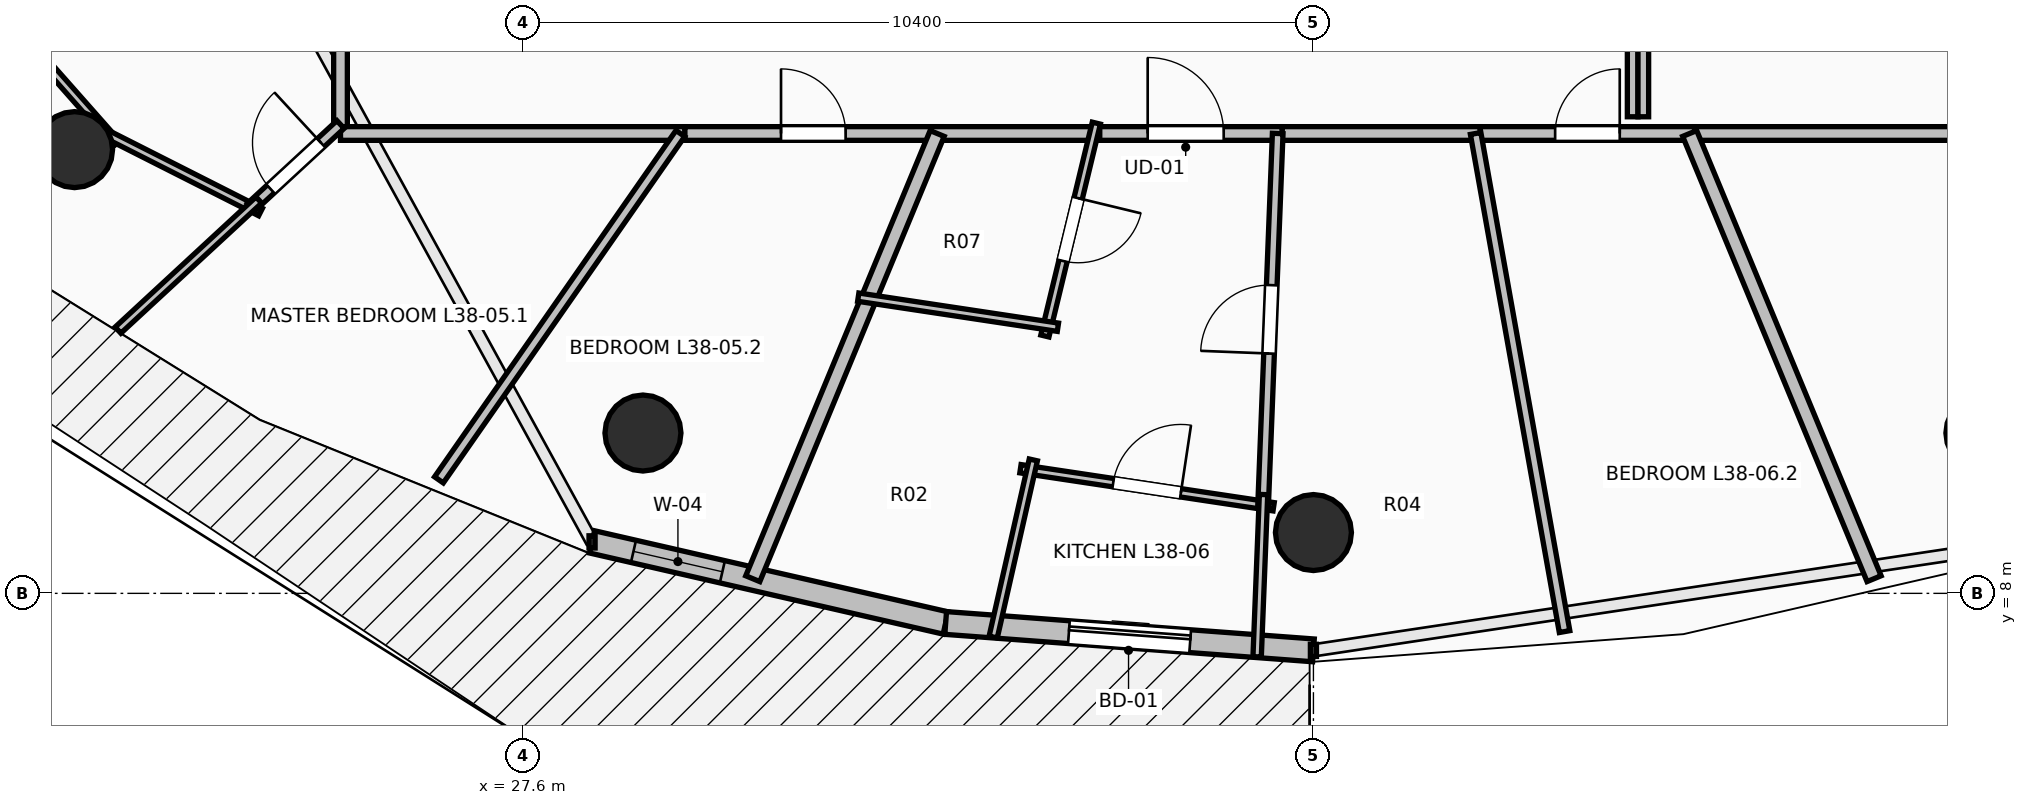
"""IFC4 building model, lengths in metres.
Left out: names, types, materials, properties, quantities, classifications, styles, units other than length and angle.
Written with IfcOpenShell. Run it as: python <this file> out.ifc"""

import sys

from ifc_helpers import new_model, si_unit, direction, frame, frame_2d, origin, origin_2d, place, context, subcontext, project, spatial, rectangle, circle, extrude, element, fill, save


model = new_model("IFC4")
c1 = context("Model", 3, precision=1e-05, world=origin(), true_north=direction((0.0, 1.0)))
c2 = subcontext(c1, "Body", "Model", "MODEL_VIEW")
j1 = project(units=[si_unit("LENGTHUNIT", "METRE"), si_unit("PLANEANGLEUNIT", "RADIAN")], contexts=[c1])
p1 = place(None, origin())
s1 = spatial("IfcSite", under=j1, at=p1, CompositionType="ELEMENT")
p2 = place(p1, origin())
s2 = spatial("IfcBuilding", under=s1, at=p2, CompositionType="ELEMENT")
p3 = place(p2, frame((0.0, 0.0, 143.1)))
s3 = spatial("IfcBuildingStorey", under=s2, at=p3, CompositionType="ELEMENT", Elevation=143.1)
for number, where, z_axis, x_axis in (
    (1, (21.701, 13.838, 0.0), (0.0, 0.0, 1.0), (-0.707, -0.707, 0.0)),
    (2, (29.179, 10.109, 0.0), (0.0, 0.0, 1.0), (-0.383, -0.924, 0.0)),
    (3, (38.0, 8.8, 0.0), (0.0, 0.0, 1.0), (0.0, -1.0, 0.0)),
    (4, (46.821, 10.109, 0.0), (0.0, 0.0, 1.0), (0.383, -0.924, 0.0)),
):
    element("IfcColumn", number, at=place(p3, frame(where, z_axis=z_axis, x_axis=x_axis)), inside=s3, PredefinedType="COLUMN", context=c2, shape_type="SweptSolid", body=[
        extrude(circle(Radius=0.5, at=origin_2d()), origin(), (0.0, 0.0, 1.0), 3.5),
    ])
p4 = place(p3, frame((28.51, 8.677, 0.0), z_axis=(0.0, 0.0, 1.0), x_axis=(0.974698897188, -0.223521944832, 0.0)))
e5 = element("IfcWall", 5, at=p4, inside=s3, PredefinedType="STANDARD", context=c2, shape_type="SweptSolid", body=[
    extrude(rectangle(XDim=4.773, YDim=0.3, at=frame_2d((2.387, 0.0))), origin(), (0.0, 0.0, 1.0), 3.24),
])
p5 = place(p4, frame((0.559, 0.0, 0.85)))
e6 = element("IfcOpeningElement", 6, at=p5, cuts=e5, PredefinedType="OPENING", context=c2, shape_type="SweptSolid", body=[
    extrude(rectangle(XDim=1.2, YDim=1.95, at=frame_2d((0.6, 0.975))), frame((0.0, 0.165, 0.0), z_axis=(0.0, -1.0, 0.0), x_axis=(1.0, 0.0, 0.0)), (0.0, 0.0, 1.0), 0.33),
])
p6 = place(p3, frame((33.162, 7.61, 0.0), z_axis=(0.0, 0.0, 1.0), x_axis=(0.997237740067, -0.074275768499, 0.0)))
e7 = element("IfcWall", 7, at=p6, inside=s3, PredefinedType="STANDARD", context=c2, shape_type="SweptSolid", body=[
    extrude(rectangle(XDim=4.852, YDim=0.3, at=frame_2d((2.426, 0.0))), origin(), (0.0, 0.0, 1.0), 3.24),
])
p7 = place(p6, frame((1.626, 0.0, 0.0)))
e8 = element("IfcOpeningElement", 8, at=p7, cuts=e7, PredefinedType="OPENING", context=c2, shape_type="SweptSolid", body=[
    extrude(rectangle(XDim=1.6, YDim=2.3, at=frame_2d((0.8, 1.15))), frame((0.0, 0.165, 0.0), z_axis=(0.0, -1.0, 0.0), x_axis=(1.0, 0.0, 0.0)), (0.0, 0.0, 1.0), 0.33),
])
p8 = place(p3, frame((25.2, 18.244, 0.0), z_axis=(0.0, 0.0, 1.0), x_axis=(0.0, -1.0, 0.0)))
e9 = element("IfcWall", 9, at=p8, inside=s3, PredefinedType="PARTITIONING", context=c2, shape_type="SweptSolid", body=[
    extrude(rectangle(XDim=4.158, YDim=0.18, at=frame_2d((2.079, 0.0))), origin(), (0.0, 0.0, 1.0), 2.432),
])
p9 = place(p8, frame((1.579, 0.0, 0.0)))
e10 = element("IfcOpeningElement", 10, at=p9, cuts=e9, PredefinedType="OPENING", context=c2, shape_type="SweptSolid", body=[
    extrude(rectangle(XDim=1.0, YDim=2.15, at=frame_2d((0.5, 1.075))), frame((0.0, 0.105, 0.0), z_axis=(0.0, -1.0, 0.0), x_axis=(1.0, 0.0, 0.0)), (0.0, 0.0, 1.0), 0.21),
])
p10 = place(p3, frame((25.2, 14.05, 0.0), z_axis=(0.0, 0.0, 1.0), x_axis=(1.0, 0.0, 0.0)))
e11 = element("IfcWall", 11, at=p10, inside=s3, PredefinedType="PARTITIONING", context=c2, shape_type="SweptSolid", body=[
    extrude(rectangle(XDim=4.531, YDim=0.18, at=frame_2d((2.266, 0.0))), origin(), (0.0, 0.0, 1.0), 2.432),
])
p11 = place(p3, frame((29.731, 14.05, 0.0), z_axis=(0.0, 0.0, 1.0), x_axis=(1.0, 0.0, 0.0)))
e12 = element("IfcWall", 12, at=p11, inside=s3, PredefinedType="PARTITIONING", context=c2, shape_type="SweptSolid", body=[
    extrude(rectangle(XDim=3.379, YDim=0.18, at=frame_2d((1.689, 0.0))), origin(), (0.0, 0.0, 1.0), 2.972),
])
p12 = place(p11, frame((1.264, 0.0, 0.0)))
e13 = element("IfcOpeningElement", 13, at=p12, cuts=e12, PredefinedType="OPENING", context=c2, shape_type="SweptSolid", body=[
    extrude(rectangle(XDim=0.85, YDim=2.1, at=frame_2d((0.425, 1.05))), frame((0.0, 0.105, 0.0), z_axis=(0.0, -1.0, 0.0), x_axis=(1.0, 0.0, 0.0)), (0.0, 0.0, 1.0), 0.21),
])
p13 = place(p3, frame((35.049, 14.05, 0.0), z_axis=(0.0, 0.0, 1.0), x_axis=(1.0, 0.0, 0.0)))
e14 = element("IfcWall", 14, at=p13, inside=s3, PredefinedType="PARTITIONING", context=c2, shape_type="SweptSolid", body=[
    extrude(rectangle(XDim=2.541, YDim=0.18, at=frame_2d((1.271, 0.0))), origin(), (0.0, 0.0, 1.0), 2.972),
])
p14 = place(p13, frame((0.771, 0.0, 0.0)))
e15 = element("IfcOpeningElement", 15, at=p14, cuts=e14, PredefinedType="OPENING", context=c2, shape_type="SweptSolid", body=[
    extrude(rectangle(XDim=1.0, YDim=2.15, at=frame_2d((0.5, 1.075))), frame((0.0, 0.105, 0.0), z_axis=(0.0, -1.0, 0.0), x_axis=(1.0, 0.0, 0.0)), (0.0, 0.0, 1.0), 0.21),
])
p15 = place(p3, frame((32.97, 14.05, 0.0), z_axis=(0.0, 0.0, 1.0), x_axis=(1.0, 0.0, 0.0)))
e16 = element("IfcWall", 16, at=p15, inside=s3, PredefinedType="PARTITIONING", context=c2, shape_type="SweptSolid", body=[
    extrude(rectangle(XDim=2.219, YDim=0.18, at=frame_2d((1.109, 0.0))), origin(), (0.0, 0.0, 1.0), 2.972),
])
p16 = place(p3, frame((37.59, 14.05, 0.0), z_axis=(0.0, 0.0, 1.0), x_axis=(1.0, 0.0, 0.0)))
e17 = element("IfcWall", 17, at=p16, inside=s3, PredefinedType="PARTITIONING", context=c2, shape_type="SweptSolid", body=[
    extrude(rectangle(XDim=2.605, YDim=0.18, at=frame_2d((1.302, 0.0))), origin(), (0.0, 0.0, 1.0), 2.972),
])
p17 = place(p3, frame((40.195, 14.05, 0.0), z_axis=(0.0, 0.0, 1.0), x_axis=(1.0, 0.0, 0.0)))
e18 = element("IfcWall", 18, at=p17, inside=s3, PredefinedType="PARTITIONING", context=c2, shape_type="SweptSolid", body=[
    extrude(rectangle(XDim=2.82, YDim=0.18, at=frame_2d((1.41, 0.0))), origin(), (0.0, 0.0, 1.0), 2.972),
])
p18 = place(p17, frame((0.985, 0.0, 0.0)))
e19 = element("IfcOpeningElement", 19, at=p18, cuts=e18, PredefinedType="OPENING", context=c2, shape_type="SweptSolid", body=[
    extrude(rectangle(XDim=0.85, YDim=2.1, at=frame_2d((0.425, 1.05))), frame((0.0, 0.105, 0.0), z_axis=(0.0, -1.0, 0.0), x_axis=(1.0, 0.0, 0.0)), (0.0, 0.0, 1.0), 0.21),
])
p19 = place(p3, frame((43.015, 14.05, 0.0), z_axis=(0.0, 0.0, 1.0), x_axis=(1.0, 0.0, 0.0)))
e20 = element("IfcWall", 20, at=p19, inside=s3, PredefinedType="PARTITIONING", context=c2, shape_type="SweptSolid", body=[
    extrude(rectangle(XDim=7.785, YDim=0.18, at=frame_2d((3.893, 0.0))), origin(), (0.0, 0.0, 1.0), 2.432),
])
p20 = place(p19, frame((3.393, 0.0, 0.0)))
e21 = element("IfcOpeningElement", 21, at=p20, cuts=e20, PredefinedType="OPENING", context=c2, shape_type="SweptSolid", body=[
    extrude(rectangle(XDim=1.0, YDim=2.15, at=frame_2d((0.5, 1.075))), frame((0.0, 0.105, 0.0), z_axis=(0.0, -1.0, 0.0), x_axis=(1.0, 0.0, 0.0)), (0.0, 0.0, 1.0), 0.21),
])
p21 = place(p3, frame((20.935, 15.409, 0.0), z_axis=(0.0, 0.0, 1.0), x_axis=(0.66216897397, -0.749354555542, 0.0)))
e22 = element("IfcWall", 22, at=p21, inside=s3, PredefinedType="PARTITIONING", context=c2, shape_type="SweptSolid", body=[
    extrude(rectangle(XDim=1.991, YDim=0.11, at=frame_2d((0.996, 0.0))), origin(), (0.0, 0.0, 1.0), 2.432),
])
p22 = place(p3, frame((22.036, 14.085, 0.0), z_axis=(0.0, 0.0, 1.0), x_axis=(0.892312874209, -0.451417472548, 0.0)))
e23 = element("IfcWall", 23, at=p22, inside=s3, PredefinedType="PARTITIONING", context=c2, shape_type="SweptSolid", body=[
    extrude(rectangle(XDim=2.367, YDim=0.11, at=frame_2d((1.183, 0.0))), origin(), (0.0, 0.0, 1.0), 2.432),
])
p23 = place(p3, frame((24.023, 13.08, 0.0), z_axis=(0.0, 0.0, 1.0), x_axis=(0.734359451791, 0.678760779336, 0.0)))
e24 = element("IfcWall", 24, at=p23, inside=s3, PredefinedType="PARTITIONING", context=c2, shape_type="SweptSolid", body=[
    extrude(rectangle(XDim=1.603, YDim=0.14, at=frame_2d((0.801, 0.0))), origin(), (0.0, 0.0, 1.0), 2.922),
])
p24 = place(p23, frame((0.351, 0.0, 0.0)))
e25 = element("IfcOpeningElement", 25, at=p24, cuts=e24, PredefinedType="OPENING", context=c2, shape_type="SweptSolid", body=[
    extrude(rectangle(XDim=0.9, YDim=2.1, at=frame_2d((0.45, 1.05))), frame((0.0, 0.085, 0.0), z_axis=(0.0, -1.0, 0.0), x_axis=(1.0, 0.0, 0.0)), (0.0, 0.0, 1.0), 0.17),
])
p25 = place(p3, frame((22.273, 11.463, 0.0), z_axis=(0.0, 0.0, 1.0), x_axis=(0.73438401738, 0.678734200565, 0.0)))
e26 = element("IfcWall", 26, at=p25, inside=s3, PredefinedType="PARTITIONING", context=c2, shape_type="SweptSolid", body=[
    extrude(rectangle(XDim=2.522, YDim=0.11, at=frame_2d((1.261, 0.0))), origin(), (0.0, 0.0, 1.0), 2.728),
])
p26 = place(p3, frame((26.495, 9.493, 0.0), z_axis=(0.0, 0.0, 1.0), x_axis=(0.571744252323, 0.820431904509, 0.0)))
e27 = element("IfcWall", 27, at=p26, inside=s3, PredefinedType="PARTITIONING", context=c2, shape_type="SweptSolid", body=[
    extrude(rectangle(XDim=5.554, YDim=0.14, at=frame_2d((2.777, 0.0))), origin(), (0.0, 0.0, 1.0), 2.432),
])
p27 = place(p3, frame((30.624, 8.193, 0.0), z_axis=(0.0, 0.0, 1.0), x_axis=(0.382683979298, 0.923879305964, 0.0)))
e28 = element("IfcWall", 28, at=p27, inside=s3, PredefinedType="PARTITIONING", context=c2, shape_type="SweptSolid", body=[
    extrude(rectangle(XDim=6.34, YDim=0.2, at=frame_2d((3.17, 0.0))), origin(), (0.0, 0.0, 1.0), 2.728),
])
p28 = place(p3, frame((35.144, 14.186, 0.0), z_axis=(0.0, 0.0, 1.0), x_axis=(-0.234930486238, -0.972012174119, 0.0)))
e29 = element("IfcWall", 29, at=p28, inside=s3, PredefinedType="PARTITIONING", context=c2, shape_type="SweptSolid", body=[
    extrude(rectangle(XDim=2.881, YDim=0.11, at=frame_2d((1.44, 0.0))), origin(), (0.0, 0.0, 1.0), 2.922),
])
p29 = place(p28, frame((1.015, 0.0, 0.0)))
e30 = element("IfcOpeningElement", 30, at=p29, cuts=e29, PredefinedType="OPENING", context=c2, shape_type="SweptSolid", body=[
    extrude(rectangle(XDim=0.85, YDim=2.1, at=frame_2d((0.425, 1.05))), frame((0.0, 0.07, 0.0), z_axis=(0.0, -1.0, 0.0), x_axis=(1.0, 0.0, 0.0)), (0.0, 0.0, 1.0), 0.14),
])
p30 = place(p3, frame((34.638, 11.501, 0.0), z_axis=(0.0, 0.0, 1.0), x_axis=(-0.988839741605, 0.148983104484, 0.0)))
e31 = element("IfcWall", 31, at=p30, inside=s3, PredefinedType="PARTITIONING", context=c2, shape_type="SweptSolid", body=[
    extrude(rectangle(XDim=2.656, YDim=0.11, at=frame_2d((1.328, 0.0))), origin(), (0.0, 0.0, 1.0), 3.24),
])
p31 = place(p3, frame((34.146, 9.64, 0.0), z_axis=(0.0, 0.0, 1.0), x_axis=(0.988887919082, -0.148662986296, 0.0)))
e32 = element("IfcWall", 32, at=p31, inside=s3, PredefinedType="PARTITIONING", context=c2, shape_type="SweptSolid", body=[
    extrude(rectangle(XDim=3.368, YDim=0.11, at=frame_2d((1.684, 0.0))), origin(), (0.0, 0.0, 1.0), 3.24),
])
p32 = place(p31, frame((1.234, 0.0, 0.0)))
e33 = element("IfcOpeningElement", 33, at=p32, cuts=e32, PredefinedType="OPENING", context=c2, shape_type="SweptSolid", body=[
    extrude(rectangle(XDim=0.9, YDim=2.1, at=frame_2d((0.45, 1.05))), frame((0.0, 0.07, 0.0), z_axis=(0.0, -1.0, 0.0), x_axis=(1.0, 0.0, 0.0)), (0.0, 0.0, 1.0), 0.14),
])
p33 = place(p3, frame((33.787, 7.426, 0.0), z_axis=(0.0, 0.0, 1.0), x_axis=(0.220932027223, 0.975289208054, 0.0)))
e34 = element("IfcWall", 34, at=p33, inside=s3, PredefinedType="PARTITIONING", context=c2, shape_type="SweptSolid", body=[
    extrude(rectangle(XDim=2.389, YDim=0.11, at=frame_2d((1.195, 0.0))), origin(), (0.0, 0.0, 1.0), 2.728),
])
p34 = place(p3, frame((37.338, 9.16, 0.0), z_axis=(0.0, 0.0, 1.0), x_axis=(0.039260769946, 0.99922899875, 0.0)))
e35 = element("IfcWall", 35, at=p34, inside=s3, PredefinedType="PARTITIONING", context=c2, shape_type="SweptSolid", body=[
    extrude(rectangle(XDim=4.894, YDim=0.14, at=frame_2d((2.447, 0.0))), origin(), (0.0, 0.0, 1.0), 2.922),
])
p35 = place(p34, frame((1.997, 0.0, 0.0)))
e36 = element("IfcOpeningElement", 36, at=p35, cuts=e35, PredefinedType="OPENING", context=c2, shape_type="SweptSolid", body=[
    extrude(rectangle(XDim=0.9, YDim=2.1, at=frame_2d((0.45, 1.05))), frame((0.0, 0.085, 0.0), z_axis=(0.0, -1.0, 0.0), x_axis=(1.0, 0.0, 0.0)), (0.0, 0.0, 1.0), 0.17),
])
p36 = place(p3, frame((37.26, 7.165, 0.0), z_axis=(0.0, 0.0, 1.0), x_axis=(0.039310852952, 0.999227029679, 0.0)))
e37 = element("IfcWall", 37, at=p36, inside=s3, PredefinedType="PARTITIONING", context=c2, shape_type="SweptSolid", body=[
    extrude(rectangle(XDim=2.136, YDim=0.11, at=frame_2d((1.068, 0.0))), origin(), (0.0, 0.0, 1.0), 2.728),
])
p37 = place(p3, frame((41.304, 7.497, 0.0), z_axis=(0.0, 0.0, 1.0), x_axis=(-0.175753825846, 0.984434148484, 0.0)))
e38 = element("IfcWall", 38, at=p37, inside=s3, PredefinedType="PARTITIONING", context=c2, shape_type="SweptSolid", body=[
    extrude(rectangle(XDim=6.656, YDim=0.14, at=frame_2d((3.328, 0.0))), origin(), (0.0, 0.0, 1.0), 2.432),
])
p38 = place(p3, frame((45.376, 8.193, 0.0), z_axis=(0.0, 0.0, 1.0), x_axis=(-0.382683979298, 0.923879305964, 0.0)))
e39 = element("IfcWall", 39, at=p38, inside=s3, PredefinedType="PARTITIONING", context=c2, shape_type="SweptSolid", body=[
    extrude(rectangle(XDim=6.34, YDim=0.2, at=frame_2d((3.17, 0.0))), origin(), (0.0, 0.0, 1.0), 2.432),
])
for number, where, z_axis, x_axis in (
    (40, (42.2, 16.1, 0.0), (0.0, 0.0, 1.0), (0.0, -1.0, 0.0)),
    (41, (42.34, 14.27, 0.0), (0.0, 0.0, 1.0), (0.0, 1.0, 0.0)),
):
    element("IfcWall", number, at=place(p3, frame(where, z_axis=z_axis, x_axis=x_axis)), inside=s3, PredefinedType="PARTITIONING", context=c2, shape_type="SweptSolid", body=[
        extrude(rectangle(XDim=1.83, YDim=0.14, at=frame_2d((0.915, 0.0))), origin(), (0.0, 0.0, 1.0), 3.24),
    ])
p39 = place(p7, origin())
e42 = element("IfcDoor", 42, at=p39, inside=s3, OperationType="SLIDING_TO_LEFT", PredefinedType="DOOR", context=c2, shape_type="SweptSolid", body=[
    extrude(rectangle(XDim=1.6, YDim=2.3, at=frame_2d((0.8, 1.15))), frame((0.0, 0.025, 0.0), z_axis=(0.0, -1.0, 0.0), x_axis=(1.0, 0.0, 0.0)), (0.0, 0.0, 1.0), 0.05),
])
fill(e8, e42)
p40 = place(p5, origin())
e43 = element("IfcWindow", 43, at=p40, inside=s3, PartitioningType="SINGLE_PANEL", PredefinedType="WINDOW", context=c2, shape_type="SweptSolid", body=[
    extrude(rectangle(XDim=1.2, YDim=1.95, at=frame_2d((0.6, 0.975))), frame((0.0, 0.03, 0.0), z_axis=(0.0, -1.0, 0.0), x_axis=(1.0, 0.0, 0.0)), (0.0, 0.0, 1.0), 0.06),
])
fill(e6, e43)
p41 = place(p14, origin())
e44 = element("IfcDoor", 44, at=p41, inside=s3, OperationType="SINGLE_SWING_LEFT", PredefinedType="DOOR", context=c2, shape_type="SweptSolid", body=[
    extrude(rectangle(XDim=1.0, YDim=2.15, at=frame_2d((0.5, 1.075))), frame((0.0, 0.025, 0.0), z_axis=(0.0, -1.0, 0.0), x_axis=(1.0, 0.0, 0.0)), (0.0, 0.0, 1.0), 0.05),
])
fill(e15, e44)
p42 = place(p24, origin())
e45 = element("IfcDoor", 45, at=p42, inside=s3, OperationType="SINGLE_SWING_RIGHT", PredefinedType="DOOR", context=c2, shape_type="SweptSolid", body=[
    extrude(rectangle(XDim=0.9, YDim=2.1, at=frame_2d((0.45, 1.05))), frame((0.0, 0.025, 0.0), z_axis=(0.0, -1.0, 0.0), x_axis=(1.0, 0.0, 0.0)), (0.0, 0.0, 1.0), 0.05),
])
fill(e25, e45)
p43 = place(p29, origin())
e46 = element("IfcDoor", 46, at=p43, inside=s3, OperationType="SINGLE_SWING_LEFT", PredefinedType="DOOR", context=c2, shape_type="SweptSolid", body=[
    extrude(rectangle(XDim=0.85, YDim=2.1, at=frame_2d((0.425, 1.05))), frame((0.0, 0.025, 0.0), z_axis=(0.0, -1.0, 0.0), x_axis=(1.0, 0.0, 0.0)), (0.0, 0.0, 1.0), 0.05),
])
fill(e30, e46)
p44 = place(p32, origin())
e47 = element("IfcDoor", 47, at=p44, inside=s3, OperationType="SINGLE_SWING_RIGHT", PredefinedType="DOOR", context=c2, shape_type="SweptSolid", body=[
    extrude(rectangle(XDim=0.9, YDim=2.1, at=frame_2d((0.45, 1.05))), frame((0.0, 0.025, 0.0), z_axis=(0.0, -1.0, 0.0), x_axis=(1.0, 0.0, 0.0)), (0.0, 0.0, 1.0), 0.05),
])
fill(e33, e47)
p45 = place(p35, origin())
e48 = element("IfcDoor", 48, at=p45, inside=s3, OperationType="SINGLE_SWING_LEFT", PredefinedType="DOOR", context=c2, shape_type="SweptSolid", body=[
    extrude(rectangle(XDim=0.9, YDim=2.1, at=frame_2d((0.45, 1.05))), frame((0.0, 0.025, 0.0), z_axis=(0.0, -1.0, 0.0), x_axis=(1.0, 0.0, 0.0)), (0.0, 0.0, 1.0), 0.05),
])
fill(e36, e48)
p46 = place(p12, origin())
e49 = element("IfcDoor", 49, at=p46, inside=s3, OperationType="SINGLE_SWING_LEFT", PredefinedType="DOOR", context=c2, shape_type="SweptSolid", body=[
    extrude(rectangle(XDim=0.85, YDim=2.1, at=frame_2d((0.425, 1.05))), frame((0.0, 0.025, 0.0), z_axis=(0.0, -1.0, 0.0), x_axis=(1.0, 0.0, 0.0)), (0.0, 0.0, 1.0), 0.05),
])
fill(e13, e49)
p47 = place(p18, origin())
e50 = element("IfcDoor", 50, at=p47, inside=s3, OperationType="SINGLE_SWING_RIGHT", PredefinedType="DOOR", context=c2, shape_type="SweptSolid", body=[
    extrude(rectangle(XDim=0.85, YDim=2.1, at=frame_2d((0.425, 1.05))), frame((0.0, 0.025, 0.0), z_axis=(0.0, -1.0, 0.0), x_axis=(1.0, 0.0, 0.0)), (0.0, 0.0, 1.0), 0.05),
])
fill(e19, e50)
save(model, sys.argv[1])
